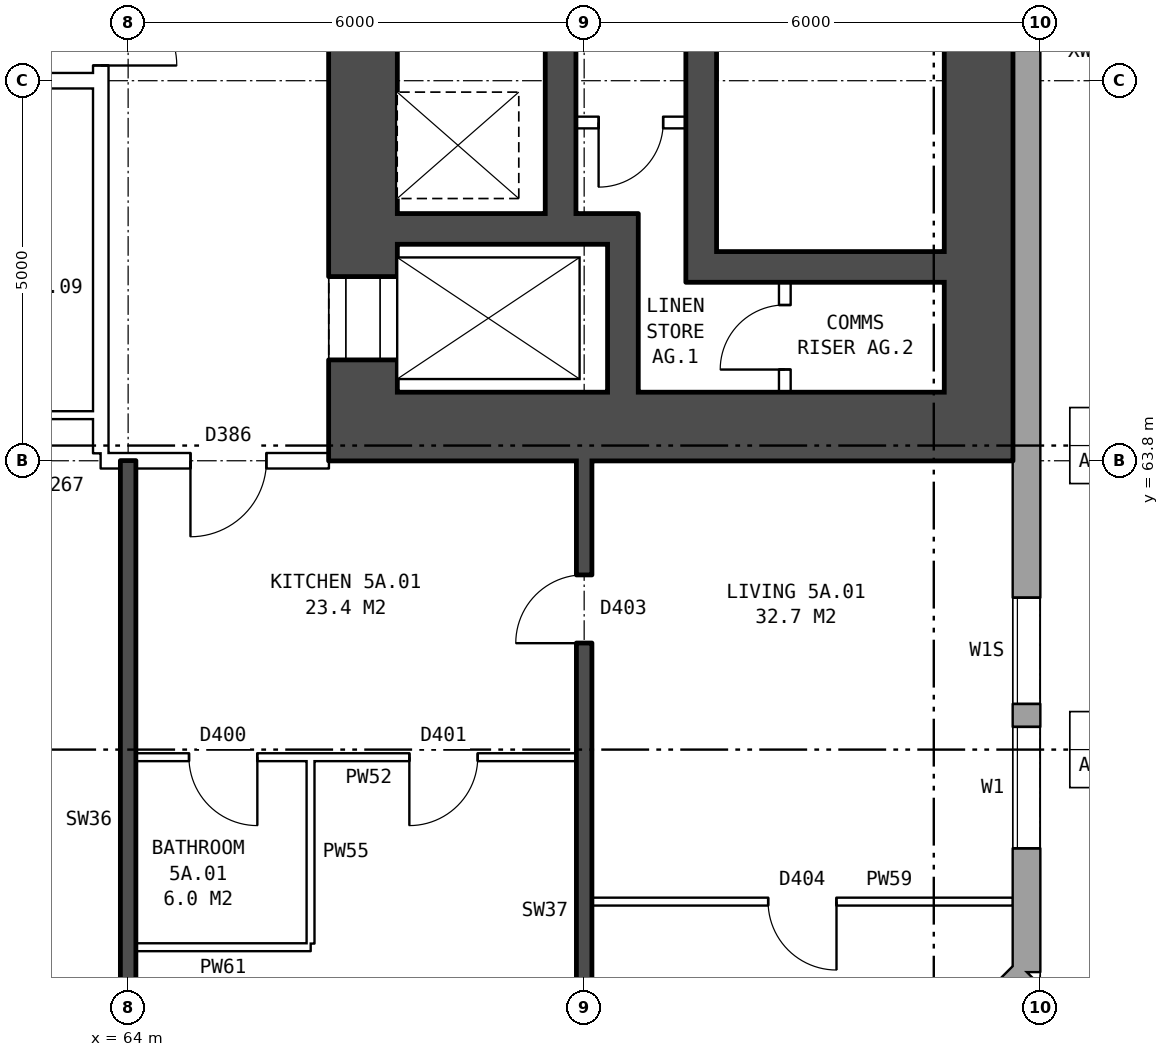
"""IFC4 building model, lengths in metres.
Left out: names, types, materials, properties, quantities, classifications, styles, units other than length and angle.
Written with IfcOpenShell. Run it as: python <this file> out.ifc"""

import sys

from ifc_helpers import new_model, si_unit, direction, frame, frame_2d, origin, place, context, subcontext, project, spatial, rectangle, extrude, element, fill, save


model = new_model("IFC4")
c1 = context("Model", 3, precision=1e-05, world=origin(), true_north=direction((0.0, 1.0)))
c2 = subcontext(c1, "Body", "Model", "MODEL_VIEW")
j1 = project(units=[si_unit("LENGTHUNIT", "METRE"), si_unit("PLANEANGLEUNIT", "RADIAN")], contexts=[c1])
p1 = place(None, origin())
s1 = spatial("IfcSite", under=j1, at=p1, CompositionType="ELEMENT")
p2 = place(p1, origin())
s2 = spatial("IfcBuilding", under=s1, at=p2, CompositionType="ELEMENT")
p3 = place(p2, frame((0.0, 0.0, 22.6)))
s3 = spatial("IfcBuildingStorey", under=s2, at=p3, CompositionType="ELEMENT", Elevation=22.6)
p4 = place(p3, frame((72.925, 54.18, 0.0), z_axis=(0.0, 0.0, 1.0), x_axis=(0.707106781187, 0.707106781187, 0.0)))
e1 = element("IfcWall", 1, at=p4, inside=s3, PredefinedType="STANDARD", context=c2, shape_type="SweptSolid", body=[
    extrude(rectangle(XDim=4.094, YDim=0.36, at=frame_2d((2.047, 0.0))), origin(), (0.0, 0.0, 1.0), 2.85),
])
p5 = place(p4, frame((1.247, 0.0, 0.8)))
e2 = element("IfcOpeningElement", 2, at=p5, cuts=e1, PredefinedType="OPENING", context=c2, shape_type="SweptSolid", body=[
    extrude(rectangle(XDim=1.6, YDim=1.8, at=frame_2d((0.8, 0.9))), frame((0.0, 0.19, 0.0), z_axis=(0.0, -1.0, 0.0), x_axis=(1.0, 0.0, 0.0)), (0.0, 0.0, 1.0), 0.38),
])
p6 = place(p3, frame((75.82, 57.075, 0.0), z_axis=(0.0, 0.0, 1.0), x_axis=(0.0, 1.0, 0.0)))
e3 = element("IfcWall", 3, at=p6, inside=s3, PredefinedType="STANDARD", context=c2, shape_type="SweptSolid", body=[
    extrude(rectangle(XDim=25.851, YDim=0.36, at=frame_2d((12.925, 0.0))), origin(), (0.0, 0.0, 1.0), 2.85),
])
p7 = place(p6, frame((1.625, 0.0, 0.8)))
e4 = element("IfcOpeningElement", 4, at=p7, cuts=e3, PredefinedType="OPENING", context=c2, shape_type="SweptSolid", body=[
    extrude(rectangle(XDim=1.6, YDim=1.8, at=frame_2d((0.8, 0.9))), frame((0.0, 0.19, 0.0), z_axis=(0.0, -1.0, 0.0), x_axis=(1.0, 0.0, 0.0)), (0.0, 0.0, 1.0), 0.38),
])
p8 = place(p6, frame((3.525, 0.0, 1.7)))
e5 = element("IfcOpeningElement", 5, at=p8, cuts=e3, PredefinedType="OPENING", context=c2, shape_type="SweptSolid", body=[
    extrude(rectangle(XDim=1.4, YDim=0.9, at=frame_2d((0.7, 0.45))), frame((0.0, 0.19, 0.0), z_axis=(0.0, -1.0, 0.0), x_axis=(1.0, 0.0, 0.0)), (0.0, 0.0, 1.0), 0.38),
])
p9 = place(p6, frame((20.825, 0.0, 1.7)))
e6 = element("IfcOpeningElement", 6, at=p9, cuts=e3, PredefinedType="OPENING", context=c2, shape_type="SweptSolid", body=[
    extrude(rectangle(XDim=1.4, YDim=0.9, at=frame_2d((0.7, 0.45))), frame((0.0, 0.19, 0.0), z_axis=(0.0, -1.0, 0.0), x_axis=(1.0, 0.0, 0.0)), (0.0, 0.0, 1.0), 0.38),
])
p10 = place(p6, frame((22.625, 0.0, 0.8)))
e7 = element("IfcOpeningElement", 7, at=p10, cuts=e3, PredefinedType="OPENING", context=c2, shape_type="SweptSolid", body=[
    extrude(rectangle(XDim=1.6, YDim=1.8, at=frame_2d((0.8, 0.9))), frame((0.0, 0.19, 0.0), z_axis=(0.0, -1.0, 0.0), x_axis=(1.0, 0.0, 0.0)), (0.0, 0.0, 1.0), 0.38),
])
p11 = place(p3, frame((67.09, 64.7, 0.0), z_axis=(0.0, 0.0, 1.0), x_axis=(0.0, 1.0, 0.0)))
e8 = element("IfcWall", 8, at=p11, inside=s3, PredefinedType="SHEAR", context=c2, shape_type="SweptSolid", body=[
    extrude(rectangle(XDim=10.6, YDim=0.9, at=frame_2d((5.3, 0.0))), origin(), (0.0, 0.0, 1.0), 2.85),
])
p12 = place(p11, frame((0.425, 0.0, 0.0)))
e9 = element("IfcOpeningElement", 9, at=p12, cuts=e8, PredefinedType="OPENING", context=c2, shape_type="SweptSolid", body=[
    extrude(rectangle(XDim=1.1, YDim=2.1, at=frame_2d((0.55, 1.05))), frame((0.0, 0.46, 0.0), z_axis=(0.0, -1.0, 0.0), x_axis=(1.0, 0.0, 0.0)), (0.0, 0.0, 1.0), 0.92),
])
p13 = place(p11, frame((9.0, 0.0, 0.0)))
e10 = element("IfcOpeningElement", 10, at=p13, cuts=e8, PredefinedType="OPENING", context=c2, shape_type="SweptSolid", body=[
    extrude(rectangle(XDim=1.1, YDim=2.1, at=frame_2d((0.55, 1.05))), frame((0.0, 0.46, 0.0), z_axis=(0.0, -1.0, 0.0), x_axis=(1.0, 0.0, 0.0)), (0.0, 0.0, 1.0), 0.92),
])
p14 = place(p3, frame((75.19, 64.7, 0.0), z_axis=(0.0, 0.0, 1.0), x_axis=(0.0, 1.0, 0.0)))
e11 = element("IfcWall", 11, at=p14, inside=s3, PredefinedType="SHEAR", context=c2, shape_type="SweptSolid", body=[
    extrude(rectangle(XDim=10.6, YDim=0.9, at=frame_2d((5.3, 0.0))), origin(), (0.0, 0.0, 1.0), 2.85),
])
p15 = place(p3, frame((66.64, 64.25, 0.0), z_axis=(0.0, 0.0, 1.0), x_axis=(1.0, 0.0, 0.0)))
e12 = element("IfcWall", 12, at=p15, inside=s3, PredefinedType="SHEAR", context=c2, shape_type="SweptSolid", body=[
    extrude(rectangle(XDim=9.0, YDim=0.9, at=frame_2d((4.5, 0.0))), origin(), (0.0, 0.0, 1.0), 2.85),
])
p16 = place(p3, frame((71.74, 66.35, 0.0), z_axis=(0.0, 0.0, 1.0), x_axis=(1.0, 0.0, 0.0)))
e13 = element("IfcWall", 13, at=p16, inside=s3, PredefinedType="SHEAR", context=c2, shape_type="SweptSolid", body=[
    extrude(rectangle(XDim=3.0, YDim=0.4, at=frame_2d((1.5, 0.0))), origin(), (0.0, 0.0, 1.0), 2.85),
])
p17 = place(p3, frame((67.54, 66.85, 0.0), z_axis=(0.0, 0.0, 1.0), x_axis=(1.0, 0.0, 0.0)))
e14 = element("IfcWall", 14, at=p17, inside=s3, PredefinedType="SHEAR", context=c2, shape_type="SweptSolid", body=[
    extrude(rectangle(XDim=3.17, YDim=0.4, at=frame_2d((1.585, 0.0))), origin(), (0.0, 0.0, 1.0), 2.85),
])
p18 = place(p3, frame((69.89, 68.25, 0.0), z_axis=(0.0, 0.0, 1.0), x_axis=(1.0, 0.0, 0.0)))
e15 = element("IfcWall", 15, at=p18, inside=s3, PredefinedType="PARTITIONING", context=c2, shape_type="SweptSolid", body=[
    extrude(rectangle(XDim=1.45, YDim=0.15, at=frame_2d((0.725, 0.0))), origin(), (0.0, 0.0, 1.0), 2.85),
])
p19 = place(p18, frame((0.3, 0.0, 0.0)))
e16 = element("IfcOpeningElement", 16, at=p19, cuts=e15, PredefinedType="OPENING", context=c2, shape_type="SweptSolid", body=[
    extrude(rectangle(XDim=0.85, YDim=2.1, at=frame_2d((0.425, 1.05))), frame((0.0, 0.085, 0.0), z_axis=(0.0, -1.0, 0.0), x_axis=(1.0, 0.0, 0.0)), (0.0, 0.0, 1.0), 0.17),
])
p20 = place(p3, frame((69.69, 67.05, 0.0), z_axis=(0.0, 0.0, 1.0), x_axis=(0.0, 1.0, 0.0)))
e17 = element("IfcWall", 17, at=p20, inside=s3, PredefinedType="SHEAR", context=c2, shape_type="SweptSolid", body=[
    extrude(rectangle(XDim=6.6, YDim=0.4, at=frame_2d((3.3, 0.0))), origin(), (0.0, 0.0, 1.0), 2.85),
])
p21 = place(p3, frame((70.51, 64.7, 0.0), z_axis=(0.0, 0.0, 1.0), x_axis=(0.0, 1.0, 0.0)))
e18 = element("IfcWall", 18, at=p21, inside=s3, PredefinedType="SHEAR", context=c2, shape_type="SweptSolid", body=[
    extrude(rectangle(XDim=1.95, YDim=0.4, at=frame_2d((0.975, 0.0))), origin(), (0.0, 0.0, 1.0), 2.85),
])
p22 = place(p3, frame((71.54, 66.15, 0.0), z_axis=(0.0, 0.0, 1.0), x_axis=(0.0, 1.0, 0.0)))
e19 = element("IfcWall", 19, at=p22, inside=s3, PredefinedType="SHEAR", context=c2, shape_type="SweptSolid", body=[
    extrude(rectangle(XDim=7.5, YDim=0.4, at=frame_2d((3.75, 0.0))), origin(), (0.0, 0.0, 1.0), 2.85),
])
p23 = place(p3, frame((72.64, 64.7, 0.0), z_axis=(0.0, 0.0, 1.0), x_axis=(0.0, 1.0, 0.0)))
e20 = element("IfcWall", 20, at=p23, inside=s3, PredefinedType="PARTITIONING", context=c2, shape_type="SweptSolid", body=[
    extrude(rectangle(XDim=1.45, YDim=0.15, at=frame_2d((0.725, 0.0))), origin(), (0.0, 0.0, 1.0), 2.85),
])
p24 = place(p23, frame((0.3, 0.0, 0.0)))
e21 = element("IfcOpeningElement", 21, at=p24, cuts=e20, PredefinedType="OPENING", context=c2, shape_type="SweptSolid", body=[
    extrude(rectangle(XDim=0.85, YDim=2.1, at=frame_2d((0.425, 1.05))), frame((0.0, 0.085, 0.0), z_axis=(0.0, -1.0, 0.0), x_axis=(1.0, 0.0, 0.0)), (0.0, 0.0, 1.0), 0.17),
])
p25 = place(p3, frame((63.64, 63.9, 0.0), z_axis=(0.0, 0.0, 1.0), x_axis=(0.0, 1.0, 0.0)))
e22 = element("IfcWall", 22, at=p25, inside=s3, PredefinedType="PARTITIONING", context=c2, shape_type="SweptSolid", body=[
    extrude(rectangle(XDim=12.2, YDim=0.2, at=frame_2d((6.1, 0.0))), origin(), (0.0, 0.0, 1.0), 2.85),
])
p26 = place(p25, frame((5.1, 0.0, 0.0)))
e23 = element("IfcOpeningElement", 23, at=p26, cuts=e22, PredefinedType="OPENING", context=c2, shape_type="SweptSolid", body=[
    extrude(rectangle(XDim=2.0, YDim=2.1, at=frame_2d((1.0, 1.05))), frame((0.0, 0.11, 0.0), z_axis=(0.0, -1.0, 0.0), x_axis=(1.0, 0.0, 0.0)), (0.0, 0.0, 1.0), 0.22),
])
p27 = place(p3, frame((64.1, 57.4, 0.0), z_axis=(0.0, 0.0, 1.0), x_axis=(1.0, 0.0, 0.0)))
e24 = element("IfcWall", 24, at=p27, inside=s3, PredefinedType="PARTITIONING", context=c2, shape_type="SweptSolid", body=[
    extrude(rectangle(XDim=2.3, YDim=0.1, at=frame_2d((1.15, 0.0))), origin(), (0.0, 0.0, 1.0), 2.85),
])
p28 = place(p3, frame((70.1, 58.0, 0.0), z_axis=(0.0, 0.0, 1.0), x_axis=(1.0, 0.0, 0.0)))
e25 = element("IfcWall", 25, at=p28, inside=s3, PredefinedType="PARTITIONING", context=c2, shape_type="SweptSolid", body=[
    extrude(rectangle(XDim=5.54, YDim=0.1, at=frame_2d((2.77, 0.0))), origin(), (0.0, 0.0, 1.0), 2.85),
])
p29 = place(p28, frame((2.32, 0.0, 0.0)))
e26 = element("IfcOpeningElement", 26, at=p29, cuts=e25, PredefinedType="OPENING", context=c2, shape_type="SweptSolid", body=[
    extrude(rectangle(XDim=0.9, YDim=2.1, at=frame_2d((0.45, 1.05))), frame((0.0, 0.06, 0.0), z_axis=(0.0, -1.0, 0.0), x_axis=(1.0, 0.0, 0.0)), (0.0, 0.0, 1.0), 0.12),
])
p30 = place(p3, frame((64.1, 59.9, 0.0), z_axis=(0.0, 0.0, 1.0), x_axis=(1.0, 0.0, 0.0)))
e27 = element("IfcWall", 27, at=p30, inside=s3, PredefinedType="PARTITIONING", context=c2, shape_type="SweptSolid", body=[
    extrude(rectangle(XDim=5.8, YDim=0.1, at=frame_2d((2.9, 0.0))), origin(), (0.0, 0.0, 1.0), 2.85),
])
p31 = place(p30, frame((3.6, 0.0, 0.0)))
e28 = element("IfcOpeningElement", 28, at=p31, cuts=e27, PredefinedType="OPENING", context=c2, shape_type="SweptSolid", body=[
    extrude(rectangle(XDim=0.9, YDim=2.1, at=frame_2d((0.45, 1.05))), frame((0.0, 0.06, 0.0), z_axis=(0.0, -1.0, 0.0), x_axis=(1.0, 0.0, 0.0)), (0.0, 0.0, 1.0), 0.12),
])
p32 = place(p30, frame((0.7, 0.0, 0.0)))
e29 = element("IfcOpeningElement", 29, at=p32, cuts=e27, PredefinedType="OPENING", context=c2, shape_type="SweptSolid", body=[
    extrude(rectangle(XDim=0.9, YDim=2.1, at=frame_2d((0.45, 1.05))), frame((0.0, 0.06, 0.0), z_axis=(0.0, -1.0, 0.0), x_axis=(1.0, 0.0, 0.0)), (0.0, 0.0, 1.0), 0.12),
])
p33 = place(p3, frame((63.64, 63.8, 0.0), z_axis=(0.0, 0.0, 1.0), x_axis=(1.0, 0.0, 0.0)))
e30 = element("IfcWall", 30, at=p33, inside=s3, PredefinedType="PARTITIONING", context=c2, shape_type="SweptSolid", body=[
    extrude(rectangle(XDim=3.0, YDim=0.2, at=frame_2d((1.5, 0.0))), origin(), (0.0, 0.0, 1.0), 2.85),
])
p34 = place(p33, frame((1.18, 0.0, 0.0)))
e31 = element("IfcOpeningElement", 31, at=p34, cuts=e30, PredefinedType="OPENING", context=c2, shape_type="SweptSolid", body=[
    extrude(rectangle(XDim=1.0, YDim=2.1, at=frame_2d((0.5, 1.05))), frame((0.0, 0.11, 0.0), z_axis=(0.0, -1.0, 0.0), x_axis=(1.0, 0.0, 0.0)), (0.0, 0.0, 1.0), 0.22),
])
p35 = place(p3, frame((61.0, 64.4, 0.0), z_axis=(0.0, 0.0, 1.0), x_axis=(1.0, 0.0, 0.0)))
e32 = element("IfcWall", 32, at=p35, inside=s3, PredefinedType="PARTITIONING", context=c2, shape_type="SweptSolid", body=[
    extrude(rectangle(XDim=2.64, YDim=0.1, at=frame_2d((1.32, 0.0))), origin(), (0.0, 0.0, 1.0), 2.85),
])
p36 = place(p3, frame((44.36, 68.8, 0.0), z_axis=(0.0, 0.0, 1.0), x_axis=(1.0, 0.0, 0.0)))
e33 = element("IfcWall", 33, at=p36, inside=s3, PredefinedType="PARTITIONING", context=c2, shape_type="SweptSolid", body=[
    extrude(rectangle(XDim=19.28, YDim=0.2, at=frame_2d((9.64, 0.0))), origin(), (0.0, 0.0, 1.0), 2.85),
])
p37 = place(p36, frame((14.64, 0.0, 0.0)))
e34 = element("IfcOpeningElement", 34, at=p37, cuts=e33, PredefinedType="OPENING", context=c2, shape_type="SweptSolid", body=[
    extrude(rectangle(XDim=1.0, YDim=2.1, at=frame_2d((0.5, 1.05))), frame((0.0, 0.11, 0.0), z_axis=(0.0, -1.0, 0.0), x_axis=(1.0, 0.0, 0.0)), (0.0, 0.0, 1.0), 0.22),
])
p38 = place(p36, frame((5.64, 0.0, 0.0)))
e35 = element("IfcOpeningElement", 35, at=p38, cuts=e33, PredefinedType="OPENING", context=c2, shape_type="SweptSolid", body=[
    extrude(rectangle(XDim=1.0, YDim=2.1, at=frame_2d((0.5, 1.05))), frame((0.0, 0.11, 0.0), z_axis=(0.0, -1.0, 0.0), x_axis=(1.0, 0.0, 0.0)), (0.0, 0.0, 1.0), 0.22),
])
p39 = place(p3, frame((64.0, 54.36, 0.0), z_axis=(0.0, 0.0, 1.0), x_axis=(0.0, 1.0, 0.0)))
e36 = element("IfcWall", 36, at=p39, inside=s3, PredefinedType="SOLIDWALL", context=c2, shape_type="SweptSolid", body=[
    extrude(rectangle(XDim=9.44, YDim=0.2, at=frame_2d((4.72, 0.0))), origin(), (0.0, 0.0, 1.0), 2.85),
])
p40 = place(p3, frame((66.4, 57.45, 0.0), z_axis=(0.0, 0.0, 1.0), x_axis=(0.0, 1.0, 0.0)))
e37 = element("IfcWall", 37, at=p40, inside=s3, PredefinedType="PARTITIONING", context=c2, shape_type="SweptSolid", body=[
    extrude(rectangle(XDim=2.4, YDim=0.1, at=frame_2d((1.2, 0.0))), origin(), (0.0, 0.0, 1.0), 2.85),
])
p41 = place(p3, frame((70.0, 54.36, 0.0), z_axis=(0.0, 0.0, 1.0), x_axis=(0.0, 1.0, 0.0)))
e38 = element("IfcWall", 38, at=p41, inside=s3, PredefinedType="SOLIDWALL", context=c2, shape_type="SweptSolid", body=[
    extrude(rectangle(XDim=9.44, YDim=0.2, at=frame_2d((4.72, 0.0))), origin(), (0.0, 0.0, 1.0), 2.85),
])
p42 = place(p41, frame((7.04, 0.0, 0.0)))
e39 = element("IfcOpeningElement", 39, at=p42, cuts=e38, PredefinedType="OPENING", context=c2, shape_type="SweptSolid", body=[
    extrude(rectangle(XDim=0.9, YDim=2.1, at=frame_2d((0.45, 1.05))), frame((0.0, 0.11, 0.0), z_axis=(0.0, -1.0, 0.0), x_axis=(1.0, 0.0, 0.0)), (0.0, 0.0, 1.0), 0.22),
])
p43 = place(p7, origin())
e40 = element("IfcWindow", 40, at=p43, inside=s3, PartitioningType="SINGLE_PANEL", PredefinedType="WINDOW", context=c2, shape_type="SweptSolid", body=[
    extrude(rectangle(XDim=1.6, YDim=1.8, at=frame_2d((0.8, 0.9))), frame((0.0, 0.15, 0.0), z_axis=(0.0, -1.0, 0.0), x_axis=(1.0, 0.0, 0.0)), (0.0, 0.0, 1.0), 0.06),
])
fill(e4, e40)
p44 = place(p8, origin())
e41 = element("IfcWindow", 41, at=p44, inside=s3, PartitioningType="SINGLE_PANEL", PredefinedType="WINDOW", context=c2, shape_type="SweptSolid", body=[
    extrude(rectangle(XDim=1.4, YDim=0.9, at=frame_2d((0.7, 0.45))), frame((0.0, 0.15, 0.0), z_axis=(0.0, -1.0, 0.0), x_axis=(1.0, 0.0, 0.0)), (0.0, 0.0, 1.0), 0.06),
])
fill(e5, e41)
p45 = place(p12, origin())
e42 = element("IfcDoor", 42, at=p45, inside=s3, OperationType="DOUBLE_DOOR_SLIDING", PredefinedType="DOOR", context=c2, shape_type="SweptSolid", body=[
    extrude(rectangle(XDim=1.1, YDim=2.1, at=frame_2d((0.55, 1.05))), frame((0.0, -0.385, 0.0), z_axis=(0.0, -1.0, 0.0), x_axis=(1.0, 0.0, 0.0)), (0.0, 0.0, 1.0), 0.05),
])
fill(e9, e42)
p46 = place(p19, frame((0.85, 0.0, 0.0), z_axis=(0.0, 0.0, 1.0), x_axis=(-1.0, 0.0, 0.0)))
e43 = element("IfcDoor", 43, at=p46, inside=s3, OperationType="SINGLE_SWING_RIGHT", PredefinedType="DOOR", context=c2, shape_type="SweptSolid", body=[
    extrude(rectangle(XDim=0.85, YDim=2.1, at=frame_2d((0.425, 1.05))), frame((0.0, 0.025, 0.0), z_axis=(0.0, -1.0, 0.0), x_axis=(1.0, 0.0, 0.0)), (0.0, 0.0, 1.0), 0.05),
])
fill(e16, e43)
p47 = place(p24, origin())
e44 = element("IfcDoor", 44, at=p47, inside=s3, OperationType="SINGLE_SWING_LEFT", PredefinedType="DOOR", context=c2, shape_type="SweptSolid", body=[
    extrude(rectangle(XDim=0.85, YDim=2.1, at=frame_2d((0.425, 1.05))), frame((0.0, 0.025, 0.0), z_axis=(0.0, -1.0, 0.0), x_axis=(1.0, 0.0, 0.0)), (0.0, 0.0, 1.0), 0.05),
])
fill(e21, e44)
p48 = place(p26, frame((2.0, 0.0, 0.0), z_axis=(0.0, 0.0, 1.0), x_axis=(-1.0, 0.0, 0.0)))
e45 = element("IfcDoor", 45, at=p48, inside=s3, OperationType="DOUBLE_DOOR_SINGLE_SWING", PredefinedType="DOOR", context=c2, shape_type="SweptSolid", body=[
    extrude(rectangle(XDim=2.0, YDim=2.1, at=frame_2d((1.0, 1.05))), frame((0.0, 0.025, 0.0), z_axis=(0.0, -1.0, 0.0), x_axis=(1.0, 0.0, 0.0)), (0.0, 0.0, 1.0), 0.05),
])
fill(e23, e45)
p49 = place(p31, frame((0.9, 0.0, 0.0), z_axis=(0.0, 0.0, 1.0), x_axis=(-1.0, 0.0, 0.0)))
e46 = element("IfcDoor", 46, at=p49, inside=s3, OperationType="SINGLE_SWING_RIGHT", PredefinedType="DOOR", context=c2, shape_type="SweptSolid", body=[
    extrude(rectangle(XDim=0.9, YDim=2.1, at=frame_2d((0.45, 1.05))), frame((0.0, 0.025, 0.0), z_axis=(0.0, -1.0, 0.0), x_axis=(1.0, 0.0, 0.0)), (0.0, 0.0, 1.0), 0.05),
])
fill(e28, e46)
p50 = place(p29, frame((0.9, 0.0, 0.0), z_axis=(0.0, 0.0, 1.0), x_axis=(-1.0, 0.0, 0.0)))
e47 = element("IfcDoor", 47, at=p50, inside=s3, OperationType="SINGLE_SWING_LEFT", PredefinedType="DOOR", context=c2, shape_type="SweptSolid", body=[
    extrude(rectangle(XDim=0.9, YDim=2.1, at=frame_2d((0.45, 1.05))), frame((0.0, 0.025, 0.0), z_axis=(0.0, -1.0, 0.0), x_axis=(1.0, 0.0, 0.0)), (0.0, 0.0, 1.0), 0.05),
])
fill(e26, e47)
p51 = place(p34, frame((1.0, 0.0, 0.0), z_axis=(0.0, 0.0, 1.0), x_axis=(-1.0, 0.0, 0.0)))
e48 = element("IfcDoor", 48, at=p51, inside=s3, OperationType="SINGLE_SWING_RIGHT", PredefinedType="DOOR", context=c2, shape_type="SweptSolid", body=[
    extrude(rectangle(XDim=1.0, YDim=2.1, at=frame_2d((0.5, 1.05))), frame((0.0, 0.025, 0.0), z_axis=(0.0, -1.0, 0.0), x_axis=(1.0, 0.0, 0.0)), (0.0, 0.0, 1.0), 0.05),
])
fill(e31, e48)
p52 = place(p42, origin())
e49 = element("IfcDoor", 49, at=p52, inside=s3, OperationType="SINGLE_SWING_LEFT", PredefinedType="DOOR", context=c2, shape_type="SweptSolid", body=[
    extrude(rectangle(XDim=0.9, YDim=2.1, at=frame_2d((0.45, 1.05))), frame((0.0, 0.025, 0.0), z_axis=(0.0, -1.0, 0.0), x_axis=(1.0, 0.0, 0.0)), (0.0, 0.0, 1.0), 0.05),
])
fill(e39, e49)
p53 = place(p32, frame((0.9, 0.0, 0.0), z_axis=(0.0, 0.0, 1.0), x_axis=(-1.0, 0.0, 0.0)))
e50 = element("IfcDoor", 50, at=p53, inside=s3, OperationType="SINGLE_SWING_LEFT", PredefinedType="DOOR", context=c2, shape_type="SweptSolid", body=[
    extrude(rectangle(XDim=0.9, YDim=2.1, at=frame_2d((0.45, 1.05))), frame((0.0, 0.025, 0.0), z_axis=(0.0, -1.0, 0.0), x_axis=(1.0, 0.0, 0.0)), (0.0, 0.0, 1.0), 0.05),
])
fill(e29, e50)
save(model, sys.argv[1])
